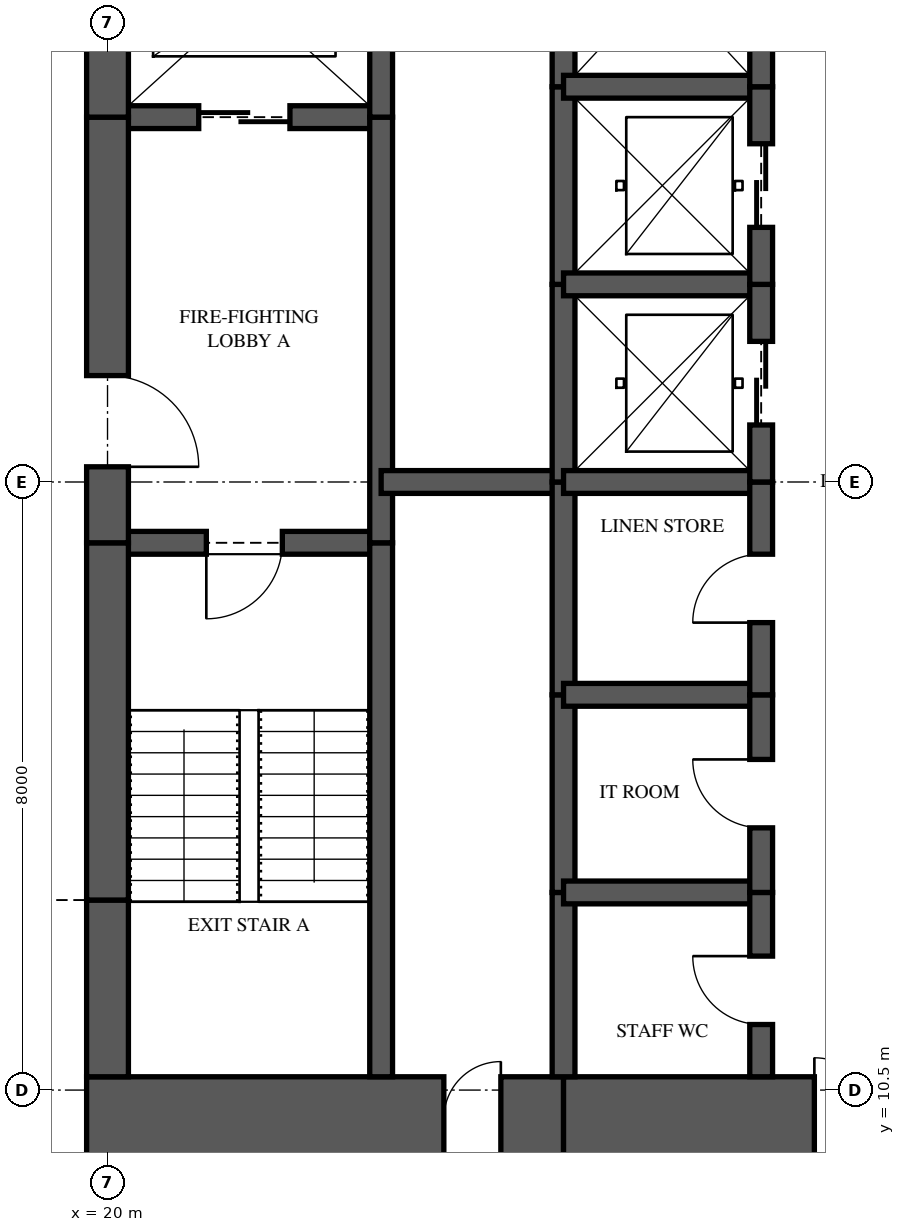
"""IFC4 building model, lengths in metres.
Left out: names, types, materials, properties, quantities, classifications, styles, units other than length and angle.
Written with IfcOpenShell. Run it as: python <this file> out.ifc"""

import sys

from ifc_helpers import new_model, si_unit, direction, frame, frame_2d, origin, place, context, subcontext, project, spatial, rectangle, extrude, element, fill, save


model = new_model("IFC4")
c1 = context("Model", 3, precision=1e-05, world=origin(), true_north=direction((0.0, 1.0)))
c2 = subcontext(c1, "Body", "Model", "MODEL_VIEW")
j1 = project(units=[si_unit("LENGTHUNIT", "METRE"), si_unit("PLANEANGLEUNIT", "RADIAN")], contexts=[c1])
p1 = place(None, origin())
s1 = spatial("IfcSite", under=j1, at=p1, CompositionType="ELEMENT")
p2 = place(p1, origin())
s2 = spatial("IfcBuilding", under=s1, at=p2, CompositionType="ELEMENT")
p3 = place(p2, frame((0.0, 0.0, 217.95)))
s3 = spatial("IfcBuildingStorey", under=s2, at=p3, CompositionType="ELEMENT", Elevation=217.95)
p4 = place(p3, frame((19.725, 10.125, 0.0), z_axis=(0.0, 0.0, 1.0), x_axis=(1.0, 0.0, 0.0)))
e1 = element("IfcWall", 1, at=p4, inside=s3, PredefinedType="SHEAR", context=c2, shape_type="SweptSolid", body=[
    extrude(rectangle(XDim=6.275, YDim=1.1, at=frame_2d((3.137, 0.0))), origin(), (0.0, 0.0, 1.0), 3.5),
])
p5 = place(p4, frame((4.7, 0.0, 0.0)))
e2 = element("IfcOpeningElement", 2, at=p5, cuts=e1, PredefinedType="OPENING", context=c2, shape_type="SweptSolid", body=[
    extrude(rectangle(XDim=0.75, YDim=2.1, at=frame_2d((0.375, 1.05))), frame((0.0, 0.56, 0.0), z_axis=(0.0, -1.0, 0.0), x_axis=(1.0, 0.0, 0.0)), (0.0, 0.0, 1.0), 1.12),
])
p6 = place(p3, frame((26.0, 10.125, 0.0), z_axis=(0.0, 0.0, 1.0), x_axis=(1.0, 0.0, 0.0)))
e3 = element("IfcWall", 3, at=p6, inside=s3, PredefinedType="SHEAR", context=c2, shape_type="SweptSolid", body=[
    extrude(rectangle(XDim=5.6, YDim=1.1, at=frame_2d((2.8, 0.0))), origin(), (0.0, 0.0, 1.0), 3.5),
])
p7 = place(p6, frame((3.3, 0.0, 0.0)))
e4 = element("IfcOpeningElement", 4, at=p7, cuts=e3, PredefinedType="OPENING", context=c2, shape_type="SweptSolid", body=[
    extrude(rectangle(XDim=1.6, YDim=2.1, at=frame_2d((0.8, 1.05))), frame((0.0, 0.56, 0.0), z_axis=(0.0, -1.0, 0.0), x_axis=(1.0, 0.0, 0.0)), (0.0, 0.0, 1.0), 1.12),
])
p8 = place(p3, frame((20.0, 26.325, 0.0), z_axis=(0.0, 0.0, 1.0), x_axis=(0.0, -1.0, 0.0)))
e5 = element("IfcWall", 5, at=p8, inside=s3, PredefinedType="SHEAR", context=c2, shape_type="SweptSolid", body=[
    extrude(rectangle(XDim=3.025, YDim=0.55, at=frame_2d((1.512, 0.0))), origin(), (0.0, 0.0, 1.0), 3.5),
])
p9 = place(p3, frame((20.0, 23.3, 0.0), z_axis=(0.0, 0.0, 1.0), x_axis=(0.0, -1.0, 0.0)))
e6 = element("IfcWall", 6, at=p9, inside=s3, PredefinedType="SHEAR", context=c2, shape_type="SweptSolid", body=[
    extrude(rectangle(XDim=5.6, YDim=0.55, at=frame_2d((2.8, 0.0))), origin(), (0.0, 0.0, 1.0), 3.5),
])
p10 = place(p9, frame((3.4, 0.0, 0.0)))
e7 = element("IfcOpeningElement", 7, at=p10, cuts=e6, PredefinedType="OPENING", context=c2, shape_type="SweptSolid", body=[
    extrude(rectangle(XDim=1.2, YDim=2.2, at=frame_2d((0.6, 1.1))), frame((0.0, 0.285, 0.0), z_axis=(0.0, -1.0, 0.0), x_axis=(1.0, 0.0, 0.0)), (0.0, 0.0, 1.0), 0.57),
])
p11 = place(p3, frame((20.0, 17.7, 0.0), z_axis=(0.0, 0.0, 1.0), x_axis=(0.0, -1.0, 0.0)))
e8 = element("IfcWall", 8, at=p11, inside=s3, PredefinedType="SHEAR", context=c2, shape_type="SweptSolid", body=[
    extrude(rectangle(XDim=4.7, YDim=0.55, at=frame_2d((2.35, 0.0))), origin(), (0.0, 0.0, 1.0), 3.5),
])
p12 = place(p3, frame((20.0, 13.0, 0.0), z_axis=(0.0, 0.0, 1.0), x_axis=(0.0, -1.0, 0.0)))
e9 = element("IfcWall", 9, at=p12, inside=s3, PredefinedType="SHEAR", context=c2, shape_type="SweptSolid", body=[
    extrude(rectangle(XDim=2.325, YDim=0.55, at=frame_2d((1.163, 0.0))), origin(), (0.0, 0.0, 1.0), 3.5),
])
p13 = place(p3, frame((23.6, 10.675, 0.0), z_axis=(0.0, 0.0, 1.0), x_axis=(0.0, 1.0, 0.0)))
e10 = element("IfcWall", 10, at=p13, inside=s3, PredefinedType="SHEAR", context=c2, shape_type="SweptSolid", body=[
    extrude(rectangle(XDim=7.025, YDim=0.3, at=frame_2d((3.512, 0.0))), origin(), (0.0, 0.0, 1.0), 3.5),
])
p14 = place(p3, frame((23.6, 17.7, 0.0), z_axis=(0.0, 0.0, 1.0), x_axis=(0.0, 1.0, 0.0)))
e11 = element("IfcWall", 11, at=p14, inside=s3, PredefinedType="SHEAR", context=c2, shape_type="SweptSolid", body=[
    extrude(rectangle(XDim=5.6, YDim=0.3, at=frame_2d((2.8, 0.0))), origin(), (0.0, 0.0, 1.0), 3.5),
])
p15 = place(p3, frame((23.6, 23.3, 0.0), z_axis=(0.0, 0.0, 1.0), x_axis=(0.0, 1.0, 0.0)))
e12 = element("IfcWall", 12, at=p15, inside=s3, PredefinedType="SHEAR", context=c2, shape_type="SweptSolid", body=[
    extrude(rectangle(XDim=3.025, YDim=0.3, at=frame_2d((1.512, 0.0))), origin(), (0.0, 0.0, 1.0), 3.5),
])
p16 = place(p3, frame((26.0, 10.675, 0.0), z_axis=(0.0, 0.0, 1.0), x_axis=(0.0, 1.0, 0.0)))
e13 = element("IfcWall", 13, at=p16, inside=s3, PredefinedType="SHEAR", context=c2, shape_type="SweptSolid", body=[
    extrude(rectangle(XDim=2.425, YDim=0.3, at=frame_2d((1.212, 0.0))), origin(), (0.0, 0.0, 1.0), 3.5),
])
p17 = place(p3, frame((26.0, 13.1, 0.0), z_axis=(0.0, 0.0, 1.0), x_axis=(0.0, 1.0, 0.0)))
e14 = element("IfcWall", 14, at=p17, inside=s3, PredefinedType="SHEAR", context=c2, shape_type="SweptSolid", body=[
    extrude(rectangle(XDim=2.6, YDim=0.3, at=frame_2d((1.3, 0.0))), origin(), (0.0, 0.0, 1.0), 3.5),
])
p18 = place(p3, frame((26.0, 15.7, 0.0), z_axis=(0.0, 0.0, 1.0), x_axis=(0.0, 1.0, 0.0)))
e15 = element("IfcWall", 15, at=p18, inside=s3, PredefinedType="SHEAR", context=c2, shape_type="SweptSolid", body=[
    extrude(rectangle(XDim=2.8, YDim=0.3, at=frame_2d((1.4, 0.0))), origin(), (0.0, 0.0, 1.0), 3.5),
])
p19 = place(p3, frame((26.0, 18.5, 0.0), z_axis=(0.0, 0.0, 1.0), x_axis=(0.0, 1.0, 0.0)))
e16 = element("IfcWall", 16, at=p19, inside=s3, PredefinedType="SHEAR", context=c2, shape_type="SweptSolid", body=[
    extrude(rectangle(XDim=2.6, YDim=0.3, at=frame_2d((1.3, 0.0))), origin(), (0.0, 0.0, 1.0), 3.5),
])
p20 = place(p3, frame((26.0, 21.1, 0.0), z_axis=(0.0, 0.0, 1.0), x_axis=(0.0, 1.0, 0.0)))
e17 = element("IfcWall", 17, at=p20, inside=s3, PredefinedType="SHEAR", context=c2, shape_type="SweptSolid", body=[
    extrude(rectangle(XDim=2.6, YDim=0.3, at=frame_2d((1.3, 0.0))), origin(), (0.0, 0.0, 1.0), 3.5),
])
p21 = place(p3, frame((26.0, 23.7, 0.0), z_axis=(0.0, 0.0, 1.0), x_axis=(0.0, 1.0, 0.0)))
e18 = element("IfcWall", 18, at=p21, inside=s3, PredefinedType="SHEAR", context=c2, shape_type="SweptSolid", body=[
    extrude(rectangle(XDim=2.625, YDim=0.3, at=frame_2d((1.312, 0.0))), origin(), (0.0, 0.0, 1.0), 3.5),
])
p22 = place(p3, frame((28.6, 10.675, 0.0), z_axis=(0.0, 0.0, 1.0), x_axis=(0.0, 1.0, 0.0)))
e19 = element("IfcWall", 19, at=p22, inside=s3, PredefinedType="SHEAR", context=c2, shape_type="SweptSolid", body=[
    extrude(rectangle(XDim=2.425, YDim=0.3, at=frame_2d((1.212, 0.0))), origin(), (0.0, 0.0, 1.0), 3.5),
])
p23 = place(p22, frame((0.688, 0.0, 0.0)))
e20 = element("IfcOpeningElement", 20, at=p23, cuts=e19, PredefinedType="OPENING", context=c2, shape_type="SweptSolid", body=[
    extrude(rectangle(XDim=0.9, YDim=2.1, at=frame_2d((0.45, 1.05))), frame((0.0, 0.16, 0.0), z_axis=(0.0, -1.0, 0.0), x_axis=(1.0, 0.0, 0.0)), (0.0, 0.0, 1.0), 0.32),
])
p24 = place(p3, frame((28.6, 13.1, 0.0), z_axis=(0.0, 0.0, 1.0), x_axis=(0.0, 1.0, 0.0)))
e21 = element("IfcWall", 21, at=p24, inside=s3, PredefinedType="SHEAR", context=c2, shape_type="SweptSolid", body=[
    extrude(rectangle(XDim=2.6, YDim=0.3, at=frame_2d((1.3, 0.0))), origin(), (0.0, 0.0, 1.0), 3.5),
])
p25 = place(p24, frame((0.85, 0.0, 0.0)))
e22 = element("IfcOpeningElement", 22, at=p25, cuts=e21, PredefinedType="OPENING", context=c2, shape_type="SweptSolid", body=[
    extrude(rectangle(XDim=0.9, YDim=2.1, at=frame_2d((0.45, 1.05))), frame((0.0, 0.16, 0.0), z_axis=(0.0, -1.0, 0.0), x_axis=(1.0, 0.0, 0.0)), (0.0, 0.0, 1.0), 0.32),
])
p26 = place(p3, frame((28.6, 15.7, 0.0), z_axis=(0.0, 0.0, 1.0), x_axis=(0.0, 1.0, 0.0)))
e23 = element("IfcWall", 23, at=p26, inside=s3, PredefinedType="SHEAR", context=c2, shape_type="SweptSolid", body=[
    extrude(rectangle(XDim=2.8, YDim=0.3, at=frame_2d((1.4, 0.0))), origin(), (0.0, 0.0, 1.0), 3.5),
])
p27 = place(p26, frame((0.95, 0.0, 0.0)))
e24 = element("IfcOpeningElement", 24, at=p27, cuts=e23, PredefinedType="OPENING", context=c2, shape_type="SweptSolid", body=[
    extrude(rectangle(XDim=0.9, YDim=2.1, at=frame_2d((0.45, 1.05))), frame((0.0, 0.16, 0.0), z_axis=(0.0, -1.0, 0.0), x_axis=(1.0, 0.0, 0.0)), (0.0, 0.0, 1.0), 0.32),
])
p28 = place(p3, frame((28.6, 18.5, 0.0), z_axis=(0.0, 0.0, 1.0), x_axis=(0.0, 1.0, 0.0)))
e25 = element("IfcWall", 25, at=p28, inside=s3, PredefinedType="SHEAR", context=c2, shape_type="SweptSolid", body=[
    extrude(rectangle(XDim=2.6, YDim=0.3, at=frame_2d((1.3, 0.0))), origin(), (0.0, 0.0, 1.0), 3.5),
])
p29 = place(p28, frame((0.75, 0.0, 0.0)))
e26 = element("IfcOpeningElement", 26, at=p29, cuts=e25, PredefinedType="OPENING", context=c2, shape_type="SweptSolid", body=[
    extrude(rectangle(XDim=1.1, YDim=2.1, at=frame_2d((0.55, 1.05))), frame((0.0, 0.16, 0.0), z_axis=(0.0, -1.0, 0.0), x_axis=(1.0, 0.0, 0.0)), (0.0, 0.0, 1.0), 0.32),
])
p30 = place(p3, frame((28.6, 21.1, 0.0), z_axis=(0.0, 0.0, 1.0), x_axis=(0.0, 1.0, 0.0)))
e27 = element("IfcWall", 27, at=p30, inside=s3, PredefinedType="SHEAR", context=c2, shape_type="SweptSolid", body=[
    extrude(rectangle(XDim=2.6, YDim=0.3, at=frame_2d((1.3, 0.0))), origin(), (0.0, 0.0, 1.0), 3.5),
])
p31 = place(p30, frame((0.75, 0.0, 0.0)))
e28 = element("IfcOpeningElement", 28, at=p31, cuts=e27, PredefinedType="OPENING", context=c2, shape_type="SweptSolid", body=[
    extrude(rectangle(XDim=1.1, YDim=2.1, at=frame_2d((0.55, 1.05))), frame((0.0, 0.16, 0.0), z_axis=(0.0, -1.0, 0.0), x_axis=(1.0, 0.0, 0.0)), (0.0, 0.0, 1.0), 0.32),
])
p32 = place(p3, frame((28.6, 23.7, 0.0), z_axis=(0.0, 0.0, 1.0), x_axis=(0.0, 1.0, 0.0)))
e29 = element("IfcWall", 29, at=p32, inside=s3, PredefinedType="SHEAR", context=c2, shape_type="SweptSolid", body=[
    extrude(rectangle(XDim=2.625, YDim=0.3, at=frame_2d((1.312, 0.0))), origin(), (0.0, 0.0, 1.0), 3.5),
])
p33 = place(p32, frame((0.85, 0.0, 0.0)))
e30 = element("IfcOpeningElement", 30, at=p33, cuts=e29, PredefinedType="OPENING", context=c2, shape_type="SweptSolid", body=[
    extrude(rectangle(XDim=1.1, YDim=2.1, at=frame_2d((0.55, 1.05))), frame((0.0, 0.16, 0.0), z_axis=(0.0, -1.0, 0.0), x_axis=(1.0, 0.0, 0.0)), (0.0, 0.0, 1.0), 0.32),
])
p34 = place(p3, frame((20.0, 17.7, 0.0), z_axis=(0.0, 0.0, 1.0), x_axis=(1.0, 0.0, 0.0)))
e31 = element("IfcWall", 31, at=p34, inside=s3, PredefinedType="SHEAR", context=c2, shape_type="SweptSolid", body=[
    extrude(rectangle(XDim=3.6, YDim=0.3, at=frame_2d((1.8, 0.0))), origin(), (0.0, 0.0, 1.0), 3.5),
])
p35 = place(p34, frame((1.3, 0.0, 0.0)))
e32 = element("IfcOpeningElement", 32, at=p35, cuts=e31, PredefinedType="OPENING", context=c2, shape_type="SweptSolid", body=[
    extrude(rectangle(XDim=1.0, YDim=2.1, at=frame_2d((0.5, 1.05))), frame((0.0, 0.16, 0.0), z_axis=(0.0, -1.0, 0.0), x_axis=(1.0, 0.0, 0.0)), (0.0, 0.0, 1.0), 0.32),
])
p36 = place(p3, frame((20.0, 23.3, 0.0), z_axis=(0.0, 0.0, 1.0), x_axis=(1.0, 0.0, 0.0)))
e33 = element("IfcWall", 33, at=p36, inside=s3, PredefinedType="SHEAR", context=c2, shape_type="SweptSolid", body=[
    extrude(rectangle(XDim=3.6, YDim=0.3, at=frame_2d((1.8, 0.0))), origin(), (0.0, 0.0, 1.0), 3.5),
])
p37 = place(p36, frame((1.2, 0.0, 0.0)))
e34 = element("IfcOpeningElement", 34, at=p37, cuts=e33, PredefinedType="OPENING", context=c2, shape_type="SweptSolid", body=[
    extrude(rectangle(XDim=1.2, YDim=2.1, at=frame_2d((0.6, 1.05))), frame((0.0, 0.16, 0.0), z_axis=(0.0, -1.0, 0.0), x_axis=(1.0, 0.0, 0.0)), (0.0, 0.0, 1.0), 0.32),
])
p38 = place(p3, frame((23.6, 18.5, 0.0), z_axis=(0.0, 0.0, 1.0), x_axis=(1.0, 0.0, 0.0)))
e35 = element("IfcWall", 35, at=p38, inside=s3, PredefinedType="SHEAR", context=c2, shape_type="SweptSolid", body=[
    extrude(rectangle(XDim=2.4, YDim=0.3, at=frame_2d((1.2, 0.0))), origin(), (0.0, 0.0, 1.0), 3.5),
])
for number, where, z_axis, x_axis in (
    (36, (26.0, 13.1, 0.0), (0.0, 0.0, 1.0), (1.0, 0.0, 0.0)),
    (37, (26.0, 15.7, 0.0), (0.0, 0.0, 1.0), (1.0, 0.0, 0.0)),
    (38, (26.0, 18.5, 0.0), (0.0, 0.0, 1.0), (1.0, 0.0, 0.0)),
    (39, (26.0, 21.1, 0.0), (0.0, 0.0, 1.0), (1.0, 0.0, 0.0)),
    (40, (26.0, 23.7, 0.0), (0.0, 0.0, 1.0), (1.0, 0.0, 0.0)),
):
    element("IfcWall", number, at=place(p3, frame(where, z_axis=z_axis, x_axis=x_axis)), inside=s3, PredefinedType="SHEAR", context=c2, shape_type="SweptSolid", body=[
        extrude(rectangle(XDim=2.6, YDim=0.3, at=frame_2d((1.3, 0.0))), origin(), (0.0, 0.0, 1.0), 3.5),
    ])
p39 = place(p35, frame((1.0, 0.0, 0.0), z_axis=(0.0, 0.0, 1.0), x_axis=(-1.0, 0.0, 0.0)))
e41 = element("IfcDoor", 41, at=p39, inside=s3, OperationType="SINGLE_SWING_RIGHT", PredefinedType="DOOR", context=c2, shape_type="SweptSolid", body=[
    extrude(rectangle(XDim=1.0, YDim=2.1, at=frame_2d((0.5, 1.05))), frame((0.0, 0.025, 0.0), z_axis=(0.0, -1.0, 0.0), x_axis=(1.0, 0.0, 0.0)), (0.0, 0.0, 1.0), 0.05),
])
fill(e32, e41)
p40 = place(p10, origin())
e42 = element("IfcDoor", 42, at=p40, inside=s3, OperationType="SINGLE_SWING_RIGHT", PredefinedType="DOOR", context=c2, shape_type="SweptSolid", body=[
    extrude(rectangle(XDim=1.2, YDim=2.2, at=frame_2d((0.6, 1.1))), frame((0.0, 0.025, 0.0), z_axis=(0.0, -1.0, 0.0), x_axis=(1.0, 0.0, 0.0)), (0.0, 0.0, 1.0), 0.05),
])
fill(e7, e42)
p41 = place(p37, origin())
e43 = element("IfcDoor", 43, at=p41, inside=s3, OperationType="SLIDING_TO_LEFT", PredefinedType="DOOR", context=c2, shape_type="SweptSolid", body=[
    extrude(rectangle(XDim=1.2, YDim=2.1, at=frame_2d((0.6, 1.05))), frame((0.0, 0.025, 0.0), z_axis=(0.0, -1.0, 0.0), x_axis=(1.0, 0.0, 0.0)), (0.0, 0.0, 1.0), 0.05),
])
fill(e34, e43)
p42 = place(p29, origin())
e44 = element("IfcDoor", 44, at=p42, inside=s3, OperationType="SLIDING_TO_LEFT", PredefinedType="DOOR", context=c2, shape_type="SweptSolid", body=[
    extrude(rectangle(XDim=1.1, YDim=2.1, at=frame_2d((0.55, 1.05))), frame((0.0, 0.025, 0.0), z_axis=(0.0, -1.0, 0.0), x_axis=(1.0, 0.0, 0.0)), (0.0, 0.0, 1.0), 0.05),
])
fill(e26, e44)
p43 = place(p31, origin())
e45 = element("IfcDoor", 45, at=p43, inside=s3, OperationType="SLIDING_TO_LEFT", PredefinedType="DOOR", context=c2, shape_type="SweptSolid", body=[
    extrude(rectangle(XDim=1.1, YDim=2.1, at=frame_2d((0.55, 1.05))), frame((0.0, 0.025, 0.0), z_axis=(0.0, -1.0, 0.0), x_axis=(1.0, 0.0, 0.0)), (0.0, 0.0, 1.0), 0.05),
])
fill(e28, e45)
p44 = place(p23, origin())
e46 = element("IfcDoor", 46, at=p44, inside=s3, OperationType="SINGLE_SWING_RIGHT", PredefinedType="DOOR", context=c2, shape_type="SweptSolid", body=[
    extrude(rectangle(XDim=0.9, YDim=2.1, at=frame_2d((0.45, 1.05))), frame((0.0, 0.025, 0.0), z_axis=(0.0, -1.0, 0.0), x_axis=(1.0, 0.0, 0.0)), (0.0, 0.0, 1.0), 0.05),
])
fill(e20, e46)
p45 = place(p25, origin())
e47 = element("IfcDoor", 47, at=p45, inside=s3, OperationType="SINGLE_SWING_RIGHT", PredefinedType="DOOR", context=c2, shape_type="SweptSolid", body=[
    extrude(rectangle(XDim=0.9, YDim=2.1, at=frame_2d((0.45, 1.05))), frame((0.0, 0.025, 0.0), z_axis=(0.0, -1.0, 0.0), x_axis=(1.0, 0.0, 0.0)), (0.0, 0.0, 1.0), 0.05),
])
fill(e22, e47)
p46 = place(p27, origin())
e48 = element("IfcDoor", 48, at=p46, inside=s3, OperationType="SINGLE_SWING_LEFT", PredefinedType="DOOR", context=c2, shape_type="SweptSolid", body=[
    extrude(rectangle(XDim=0.9, YDim=2.1, at=frame_2d((0.45, 1.05))), frame((0.0, 0.025, 0.0), z_axis=(0.0, -1.0, 0.0), x_axis=(1.0, 0.0, 0.0)), (0.0, 0.0, 1.0), 0.05),
])
fill(e24, e48)
p47 = place(p7, origin())
e49 = element("IfcDoor", 49, at=p47, inside=s3, OperationType="DOUBLE_DOOR_SINGLE_SWING", PredefinedType="DOOR", context=c2, shape_type="SweptSolid", body=[
    extrude(rectangle(XDim=1.6, YDim=2.1, at=frame_2d((0.8, 1.05))), frame((0.0, 0.025, 0.0), z_axis=(0.0, -1.0, 0.0), x_axis=(1.0, 0.0, 0.0)), (0.0, 0.0, 1.0), 0.05),
])
fill(e4, e49)
p48 = place(p5, origin())
e50 = element("IfcDoor", 50, at=p48, inside=s3, OperationType="SINGLE_SWING_RIGHT", PredefinedType="DOOR", context=c2, shape_type="SweptSolid", body=[
    extrude(rectangle(XDim=0.75, YDim=2.1, at=frame_2d((0.375, 1.05))), frame((0.0, 0.025, 0.0), z_axis=(0.0, -1.0, 0.0), x_axis=(1.0, 0.0, 0.0)), (0.0, 0.0, 1.0), 0.05),
])
fill(e2, e50)
save(model, sys.argv[1])
